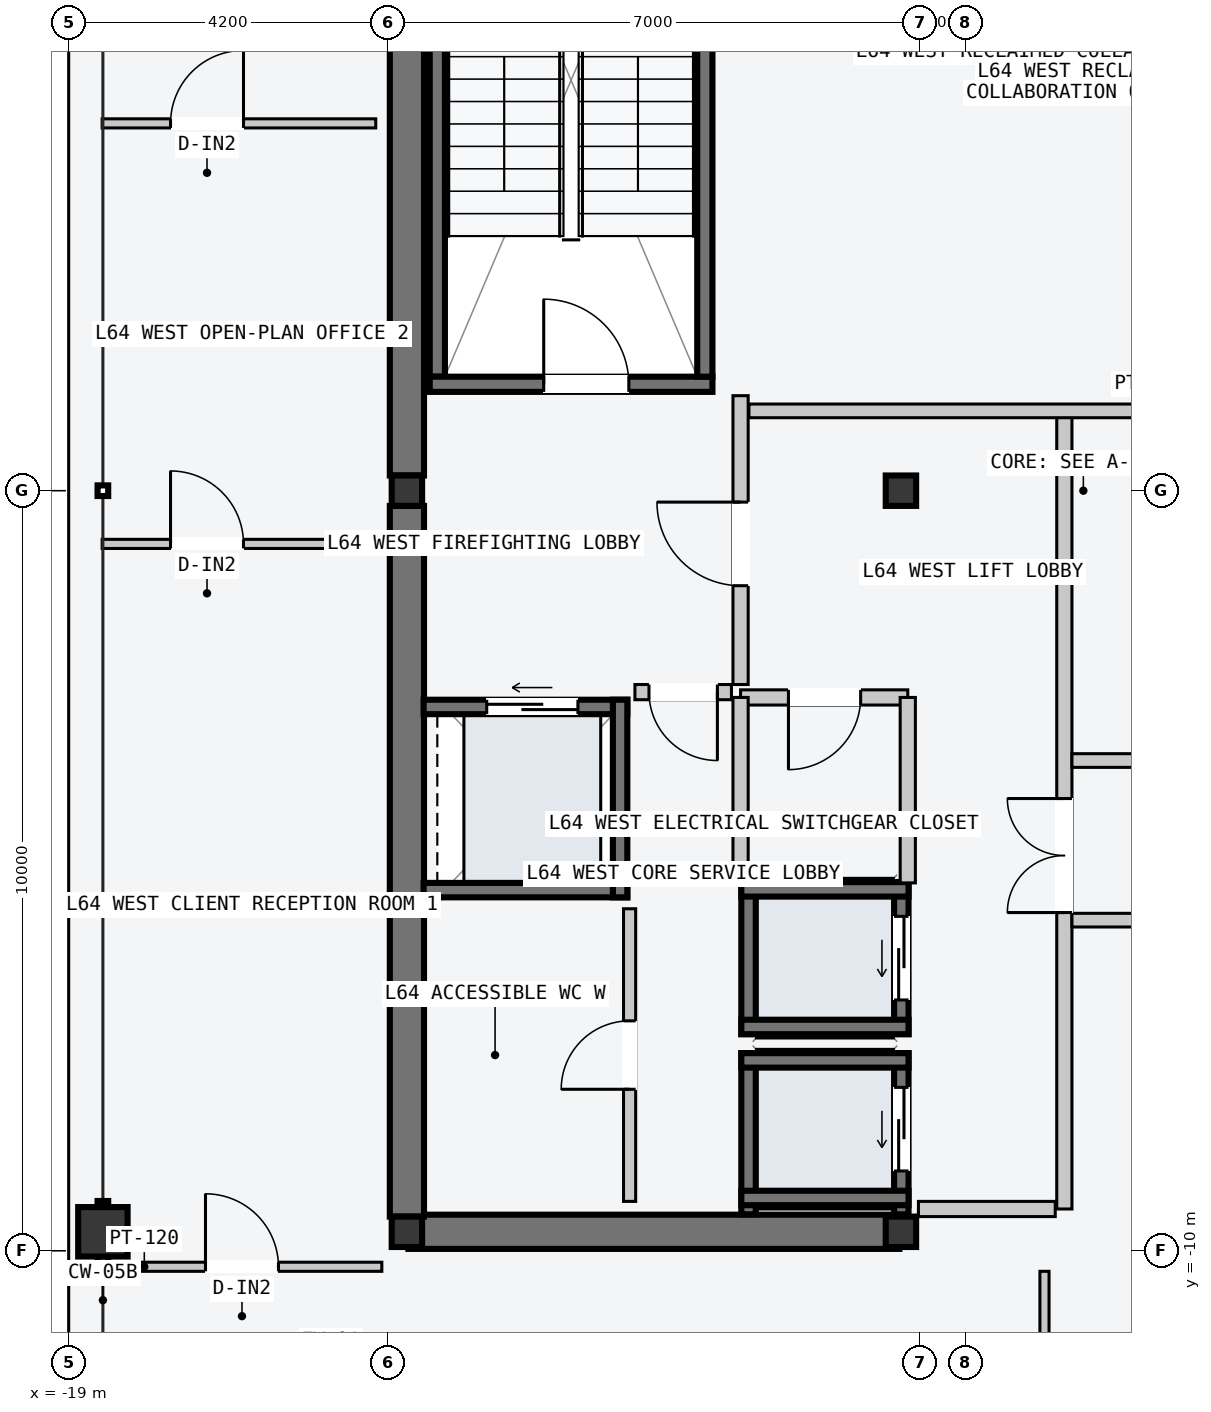
"""IFC4 building model, lengths in metres.
Left out: names, types, materials, properties, quantities, classifications, styles, units other than length and angle.
Written with IfcOpenShell. Run it as: python <this file> out.ifc"""

import sys

from ifc_helpers import new_model, si_unit, direction, frame, frame_2d, origin, origin_2d, place, context, subcontext, project, spatial, rectangle, hollow_rectangle, i_section, extrude, element, fill, save


model = new_model("IFC4")
c1 = context("Model", 3, precision=1e-05, world=origin(), true_north=direction((0.0, 1.0)))
c2 = subcontext(c1, "Body", "Model", "MODEL_VIEW")
j1 = project(units=[si_unit("LENGTHUNIT", "METRE"), si_unit("PLANEANGLEUNIT", "RADIAN")], contexts=[c1])
p1 = place(None, origin())
s1 = spatial("IfcSite", under=j1, at=p1, CompositionType="ELEMENT")
p2 = place(p1, origin())
s2 = spatial("IfcBuilding", under=s1, at=p2, CompositionType="ELEMENT")
p3 = place(p2, frame((0.0, 0.0, 243.6)))
s3 = spatial("IfcBuildingStorey", under=s2, at=p3, CompositionType="ELEMENT", Elevation=243.6)
p4 = place(p3, frame((-14.53, -9.75, -0.2), z_axis=(0.0, 0.0, 1.0), x_axis=(1.0, 0.0, 0.0)))
e1 = element("IfcWall", 1, at=p4, inside=s3, PredefinedType="SHEAR", context=c2, shape_type="SweptSolid", body=[
    extrude(rectangle(XDim=6.46, YDim=0.45, at=frame_2d((3.23, 0.0))), origin(), (0.0, 0.0, 1.0), 3.6),
])
for number, where, z_axis, x_axis in (
    (2, (-14.55, -9.55, -0.2), (0.0, 0.0, 1.0), (0.0, 1.0, 0.0)),
    (3, (-14.55, 0.2, -0.2), (0.0, 0.0, 1.0), (0.0, 1.0, 0.0)),
):
    element("IfcWall", number, at=place(p3, frame(where, z_axis=z_axis, x_axis=x_axis)), inside=s3, PredefinedType="SHEAR", context=c2, shape_type="SweptSolid", body=[
        extrude(rectangle(XDim=9.35, YDim=0.45, at=frame_2d((4.675, 0.0))), origin(), (0.0, 0.0, 1.0), 3.6),
    ])
p5 = place(p3, frame((-14.15, 1.5, -0.2), z_axis=(0.0, 0.0, 1.0), x_axis=(0.0, 1.0, 0.0)))
e4 = element("IfcWall", 4, at=p5, inside=s3, PredefinedType="SOLIDWALL", context=c2, shape_type="SweptSolid", body=[
    extrude(rectangle(XDim=7.8, YDim=0.2, at=frame_2d((3.9, 0.0))), origin(), (0.0, 0.0, 1.0), 3.6),
])
p6 = place(p3, frame((-14.25, 1.4, -0.2), z_axis=(0.0, 0.0, 1.0), x_axis=(1.0, 0.0, 0.0)))
e5 = element("IfcWall", 5, at=p6, inside=s3, PredefinedType="SOLIDWALL", context=c2, shape_type="SweptSolid", body=[
    extrude(rectangle(XDim=3.72, YDim=0.2, at=frame_2d((1.86, 0.0))), origin(), (0.0, 0.0, 1.0), 3.6),
])
p7 = place(p6, frame((1.5, 0.0, 0.2)))
e6 = element("IfcOpeningElement", 6, at=p7, cuts=e5, PredefinedType="OPENING", context=c2, shape_type="SweptSolid", body=[
    extrude(rectangle(XDim=1.12, YDim=2.18, at=frame_2d((0.56, 1.09))), frame((0.0, 0.11, 0.0), z_axis=(0.0, -1.0, 0.0), x_axis=(1.0, 0.0, 0.0)), (0.0, 0.0, 1.0), 0.22),
])
p8 = place(p3, frame((-10.63, 1.5, -0.2), z_axis=(0.0, 0.0, 1.0), x_axis=(0.0, 1.0, 0.0)))
e7 = element("IfcWall", 7, at=p8, inside=s3, PredefinedType="SOLIDWALL", context=c2, shape_type="SweptSolid", body=[
    extrude(rectangle(XDim=7.8, YDim=0.2, at=frame_2d((3.9, 0.0))), origin(), (0.0, 0.0, 1.0), 3.6),
])
for number, where, z_axis, x_axis in (
    (8, (-14.55, -9.75, 0.0), (0.0, 0.0, 1.0), (1.0, 0.0, 0.0)),
    (9, (-14.55, 0.0, 0.0), (0.0, 0.0, 1.0), (1.0, 0.0, 0.0)),
    (10, (-8.05, -9.75, 0.0), (0.0, 0.0, 1.0), (1.0, 0.0, 0.0)),
    (11, (-8.05, 0.0, 0.0), (0.0, 0.0, 1.0), (1.0, 0.0, 0.0)),
):
    element("IfcColumn", number, at=place(p3, frame(where, z_axis=z_axis, x_axis=x_axis)), inside=s3, PredefinedType="COLUMN", context=c2, shape_type="SweptSolid", body=[
        extrude(i_section(OverallWidth=0.4, OverallDepth=0.4, WebThickness=0.013, FlangeThickness=0.021, at=origin_2d()), origin(), (0.0, 0.0, 1.0), 3.6),
    ])
p9 = place(p3, frame((-18.55, -9.75, 0.0), z_axis=(0.0, 0.0, 1.0), x_axis=(0.0, 1.0, 0.0)))
e12 = element("IfcColumn", 12, at=p9, inside=s3, PredefinedType="COLUMN", context=c2, shape_type="SweptSolid", body=[
    extrude(hollow_rectangle(XDim=0.65, YDim=0.65, WallThickness=0.028, at=origin_2d()), origin(), (0.0, 0.0, 1.0), 3.6),
])
p10 = place(p3, frame((-8.045, -9.52, -0.2), z_axis=(0.0, 0.0, 1.0), x_axis=(0.0, 1.0, 0.0)))
e13 = element("IfcWall", 13, at=p10, inside=s3, PredefinedType="SOLIDWALL", context=c2, shape_type="SweptSolid", body=[
    extrude(rectangle(XDim=2.12, YDim=0.19, at=frame_2d((1.06, 0.0))), origin(), (0.0, 0.0, 1.0), 3.6),
])
p11 = place(p10, frame((0.57, 0.0, 0.2)))
e14 = element("IfcOpeningElement", 14, at=p11, cuts=e13, PredefinedType="OPENING", context=c2, shape_type="SweptSolid", body=[
    extrude(rectangle(XDim=1.1, YDim=2.2, at=frame_2d((0.55, 1.1))), frame((0.0, 0.105, 0.0), z_axis=(0.0, -1.0, 0.0), x_axis=(1.0, 0.0, 0.0)), (0.0, 0.0, 1.0), 0.21),
])
p12 = place(p3, frame((-10.055, -9.52, -0.2), z_axis=(0.0, 0.0, 1.0), x_axis=(0.0, 1.0, 0.0)))
e15 = element("IfcWall", 15, at=p12, inside=s3, PredefinedType="SOLIDWALL", context=c2, shape_type="SweptSolid", body=[
    extrude(rectangle(XDim=2.12, YDim=0.19, at=frame_2d((1.06, 0.0))), origin(), (0.0, 0.0, 1.0), 3.6),
])
for number, where, z_axis, x_axis in (
    (16, (-10.15, -7.495, -0.2), (0.0, 0.0, 1.0), (1.0, 0.0, 0.0)),
    (17, (-10.15, -9.305, -0.2), (0.0, 0.0, 1.0), (1.0, 0.0, 0.0)),
):
    element("IfcWall", number, at=place(p3, frame(where, z_axis=z_axis, x_axis=x_axis)), inside=s3, PredefinedType="SOLIDWALL", context=c2, shape_type="SweptSolid", body=[
        extrude(rectangle(XDim=2.2, YDim=0.19, at=frame_2d((1.1, 0.0))), origin(), (0.0, 0.0, 1.0), 3.6),
    ])
p13 = place(p3, frame((-8.045, -7.15, -0.2), z_axis=(0.0, 0.0, 1.0), x_axis=(0.0, 1.0, 0.0)))
e18 = element("IfcWall", 18, at=p13, inside=s3, PredefinedType="SOLIDWALL", context=c2, shape_type="SweptSolid", body=[
    extrude(rectangle(XDim=2.0, YDim=0.19, at=frame_2d((1.0, 0.0))), origin(), (0.0, 0.0, 1.0), 3.6),
])
p14 = place(p13, frame((0.45, 0.0, 0.2)))
e19 = element("IfcOpeningElement", 19, at=p14, cuts=e18, PredefinedType="OPENING", context=c2, shape_type="SweptSolid", body=[
    extrude(rectangle(XDim=1.1, YDim=2.2, at=frame_2d((0.55, 1.1))), frame((0.0, 0.105, 0.0), z_axis=(0.0, -1.0, 0.0), x_axis=(1.0, 0.0, 0.0)), (0.0, 0.0, 1.0), 0.21),
])
p15 = place(p3, frame((-10.055, -7.15, -0.2), z_axis=(0.0, 0.0, 1.0), x_axis=(0.0, 1.0, 0.0)))
e20 = element("IfcWall", 20, at=p15, inside=s3, PredefinedType="SOLIDWALL", context=c2, shape_type="SweptSolid", body=[
    extrude(rectangle(XDim=2.0, YDim=0.19, at=frame_2d((1.0, 0.0))), origin(), (0.0, 0.0, 1.0), 3.6),
])
for number, where, z_axis, x_axis in (
    (21, (-10.15, -5.245, -0.2), (0.0, 0.0, 1.0), (1.0, 0.0, 0.0)),
    (22, (-10.15, -7.055, -0.2), (0.0, 0.0, 1.0), (1.0, 0.0, 0.0)),
):
    element("IfcWall", number, at=place(p3, frame(where, z_axis=z_axis, x_axis=x_axis)), inside=s3, PredefinedType="SOLIDWALL", context=c2, shape_type="SweptSolid", body=[
        extrude(rectangle(XDim=2.2, YDim=0.19, at=frame_2d((1.1, 0.0))), origin(), (0.0, 0.0, 1.0), 3.6),
    ])
p16 = place(p3, frame((-14.33, -2.845, -0.2), z_axis=(0.0, 0.0, 1.0), x_axis=(1.0, 0.0, 0.0)))
e23 = element("IfcWall", 23, at=p16, inside=s3, PredefinedType="SOLIDWALL", context=c2, shape_type="SweptSolid", body=[
    extrude(rectangle(XDim=2.68, YDim=0.19, at=frame_2d((1.34, 0.0))), origin(), (0.0, 0.0, 1.0), 3.6),
])
p17 = place(p16, frame((0.83, 0.0, 0.2)))
e24 = element("IfcOpeningElement", 24, at=p17, cuts=e23, PredefinedType="OPENING", context=c2, shape_type="SweptSolid", body=[
    extrude(rectangle(XDim=1.2, YDim=2.2, at=frame_2d((0.6, 1.1))), frame((0.0, 0.105, 0.0), z_axis=(0.0, -1.0, 0.0), x_axis=(1.0, 0.0, 0.0)), (0.0, 0.0, 1.0), 0.21),
])
p18 = place(p3, frame((-14.33, -5.255, -0.2), z_axis=(0.0, 0.0, 1.0), x_axis=(1.0, 0.0, 0.0)))
e25 = element("IfcWall", 25, at=p18, inside=s3, PredefinedType="SOLIDWALL", context=c2, shape_type="SweptSolid", body=[
    extrude(rectangle(XDim=2.68, YDim=0.19, at=frame_2d((1.34, 0.0))), origin(), (0.0, 0.0, 1.0), 3.6),
])
p19 = place(p3, frame((-11.745, -5.35, -0.2), z_axis=(0.0, 0.0, 1.0), x_axis=(0.0, 1.0, 0.0)))
e26 = element("IfcWall", 26, at=p19, inside=s3, PredefinedType="SOLIDWALL", context=c2, shape_type="SweptSolid", body=[
    extrude(rectangle(XDim=2.6, YDim=0.19, at=frame_2d((1.3, 0.0))), origin(), (0.0, 0.0, 1.0), 3.6),
])
p20 = place(p3, frame((-5.9, -9.45, 0.0), z_axis=(0.0, 0.0, 1.0), x_axis=(0.0, 1.0, 0.0)))
e27 = element("IfcWall", 27, at=p20, inside=s3, PredefinedType="PARTITIONING", context=c2, shape_type="SweptSolid", body=[
    extrude(rectangle(XDim=10.5, YDim=0.2, at=frame_2d((5.25, 0.0))), origin(), (0.0, 0.0, 1.0), 3.4),
])
p21 = place(p20, frame((3.9, 0.0, 0.0)))
e28 = element("IfcOpeningElement", 28, at=p21, cuts=e27, PredefinedType="OPENING", context=c2, shape_type="SweptSolid", body=[
    extrude(rectangle(XDim=1.5, YDim=2.2, at=frame_2d((0.75, 1.1))), frame((0.0, 0.11, 0.0), z_axis=(0.0, -1.0, 0.0), x_axis=(1.0, 0.0, 0.0)), (0.0, 0.0, 1.0), 0.22),
])
p22 = place(p3, frame((-6.02, -9.45, 0.0), z_axis=(0.0, 0.0, 1.0), x_axis=(-1.0, 0.0, 0.0)))
e29 = element("IfcWall", 29, at=p22, inside=s3, PredefinedType="PARTITIONING", context=c2, shape_type="SweptSolid", body=[
    extrude(rectangle(XDim=1.8, YDim=0.2, at=frame_2d((0.9, 0.0))), origin(), (0.0, 0.0, 1.0), 3.4),
])
p23 = place(p3, frame((-10.16, -2.55, 0.0), z_axis=(0.0, 0.0, 1.0), x_axis=(0.0, 1.0, 0.0)))
e30 = element("IfcWall", 30, at=p23, inside=s3, PredefinedType="PARTITIONING", context=c2, shape_type="SweptSolid", body=[
    extrude(rectangle(XDim=3.8, YDim=0.2, at=frame_2d((1.9, 0.0))), origin(), (0.0, 0.0, 1.0), 3.4),
])
p24 = place(p23, frame((1.3, 0.0, 0.0)))
e31 = element("IfcOpeningElement", 31, at=p24, cuts=e30, PredefinedType="OPENING", context=c2, shape_type="SweptSolid", body=[
    extrude(rectangle(XDim=1.1, YDim=2.15, at=frame_2d((0.55, 1.075))), frame((0.0, 0.11, 0.0), z_axis=(0.0, -1.0, 0.0), x_axis=(1.0, 0.0, 0.0)), (0.0, 0.0, 1.0), 0.22),
])
p25 = place(p3, frame((-10.28, -2.65, 0.0), z_axis=(0.0, 0.0, 1.0), x_axis=(-1.0, 0.0, 0.0)))
e32 = element("IfcWall", 32, at=p25, inside=s3, PredefinedType="PARTITIONING", context=c2, shape_type="SweptSolid", body=[
    extrude(rectangle(XDim=1.27, YDim=0.2, at=frame_2d((0.635, 0.0))), origin(), (0.0, 0.0, 1.0), 3.4),
])
p26 = place(p25, frame((0.185, 0.0, 0.0)))
e33 = element("IfcOpeningElement", 33, at=p26, cuts=e32, PredefinedType="OPENING", context=c2, shape_type="SweptSolid", body=[
    extrude(rectangle(XDim=0.9, YDim=2.15, at=frame_2d((0.45, 1.075))), frame((0.0, 0.11, 0.0), z_axis=(0.0, -1.0, 0.0), x_axis=(1.0, 0.0, 0.0)), (0.0, 0.0, 1.0), 0.22),
])
p27 = place(p3, frame((-7.96, -2.72, 0.0), z_axis=(0.0, 0.0, 1.0), x_axis=(-1.0, 0.0, 0.0)))
e34 = element("IfcWall", 34, at=p27, inside=s3, PredefinedType="PARTITIONING", context=c2, shape_type="SweptSolid", body=[
    extrude(rectangle(XDim=2.2, YDim=0.2, at=frame_2d((1.1, 0.0))), origin(), (0.0, 0.0, 1.0), 3.4),
])
p28 = place(p27, frame((0.62, 0.0, 0.0)))
e35 = element("IfcOpeningElement", 35, at=p28, cuts=e34, PredefinedType="OPENING", context=c2, shape_type="SweptSolid", body=[
    extrude(rectangle(XDim=0.95, YDim=2.1, at=frame_2d((0.475, 1.05))), frame((0.0, 0.11, 0.0), z_axis=(0.0, -1.0, 0.0), x_axis=(1.0, 0.0, 0.0)), (0.0, 0.0, 1.0), 0.22),
])
for number, where, z_axis, x_axis in (
    (36, (-7.96, -5.16, 0.0), (0.0, 0.0, 1.0), (0.0, 1.0, 0.0)),
    (37, (-10.16, -5.16, 0.0), (0.0, 0.0, 1.0), (0.0, 1.0, 0.0)),
):
    element("IfcWall", number, at=place(p3, frame(where, z_axis=z_axis, x_axis=x_axis)), inside=s3, PredefinedType="PARTITIONING", context=c2, shape_type="SweptSolid", body=[
        extrude(rectangle(XDim=2.44, YDim=0.2, at=frame_2d((1.22, 0.0))), origin(), (0.0, 0.0, 1.0), 3.4),
    ])
p29 = place(p3, frame((-11.62, -9.35, 0.0), z_axis=(0.0, 0.0, 1.0), x_axis=(0.0, 1.0, 0.0)))
e38 = element("IfcWall", 38, at=p29, inside=s3, PredefinedType="PARTITIONING", context=c2, shape_type="SweptSolid", body=[
    extrude(rectangle(XDim=3.85, YDim=0.16, at=frame_2d((1.925, 0.0))), origin(), (0.0, 0.0, 1.0), 3.4),
])
p30 = place(p29, frame((1.475, 0.0, 0.0)))
e39 = element("IfcOpeningElement", 39, at=p30, cuts=e38, PredefinedType="OPENING", context=c2, shape_type="SweptSolid", body=[
    extrude(rectangle(XDim=0.9, YDim=2.15, at=frame_2d((0.45, 1.075))), frame((0.0, 0.09, 0.0), z_axis=(0.0, -1.0, 0.0), x_axis=(1.0, 0.0, 0.0)), (0.0, 0.0, 1.0), 0.18),
])
p31 = place(p3, frame((-10.05, 1.05, 0.0), z_axis=(0.0, 0.0, 1.0), x_axis=(1.0, 0.0, 0.0)))
e40 = element("IfcWall", 40, at=p31, inside=s3, PredefinedType="PARTITIONING", context=c2, shape_type="SweptSolid", body=[
    extrude(rectangle(XDim=10.54, YDim=0.18, at=frame_2d((5.27, 0.0))), origin(), (0.0, 0.0, 1.0), 3.4),
])
for number, where, z_axis, x_axis in (
    (41, (-5.8, -3.55, 0.0), (0.0, 0.0, 1.0), (1.0, 0.0, 0.0)),
    (42, (-5.8, -5.65, 0.0), (0.0, 0.0, 1.0), (1.0, 0.0, 0.0)),
):
    element("IfcWall", number, at=place(p3, frame(where, z_axis=z_axis, x_axis=x_axis)), inside=s3, PredefinedType="PARTITIONING", context=c2, shape_type="SweptSolid", body=[
        extrude(rectangle(XDim=6.29, YDim=0.18, at=frame_2d((3.145, 0.0))), origin(), (0.0, 0.0, 1.0), 3.4),
    ])
p32 = place(p3, frame((-6.161, -17.56, 0.0), z_axis=(0.0, 0.0, 1.0), x_axis=(0.0, 1.0, 0.0)))
e43 = element("IfcWall", 43, at=p32, inside=s3, PredefinedType="PARTITIONING", context=c2, shape_type="SweptSolid", body=[
    extrude(rectangle(XDim=7.29, YDim=0.12, at=frame_2d((3.645, 0.0))), origin(), (0.0, 0.0, 1.0), 3.4),
])
p33 = place(p32, frame((1.05, 0.0, 0.0)))
e44 = element("IfcOpeningElement", 44, at=p33, cuts=e43, PredefinedType="OPENING", context=c2, shape_type="SweptSolid", body=[
    extrude(rectangle(XDim=0.96, YDim=2.18, at=frame_2d((0.48, 1.09))), frame((0.0, 0.07, 0.0), z_axis=(0.0, -1.0, 0.0), x_axis=(1.0, 0.0, 0.0)), (0.0, 0.0, 1.0), 0.14),
])
p34 = place(p3, frame((-18.56, -10.21, 0.0), z_axis=(0.0, 0.0, 1.0), x_axis=(1.0, 0.0, 0.0)))
e45 = element("IfcWall", 45, at=p34, inside=s3, PredefinedType="PARTITIONING", context=c2, shape_type="SweptSolid", body=[
    extrude(rectangle(XDim=3.68, YDim=0.12, at=frame_2d((1.84, 0.0))), origin(), (0.0, 0.0, 1.0), 3.4),
])
p35 = place(p34, frame((1.36, 0.0, 0.0)))
e46 = element("IfcOpeningElement", 46, at=p35, cuts=e45, PredefinedType="OPENING", context=c2, shape_type="SweptSolid", body=[
    extrude(rectangle(XDim=0.96, YDim=2.18, at=frame_2d((0.48, 1.09))), frame((0.0, 0.07, 0.0), z_axis=(0.0, -1.0, 0.0), x_axis=(1.0, 0.0, 0.0)), (0.0, 0.0, 1.0), 0.14),
])
p36 = place(p3, frame((-18.56, -0.7, 0.0), z_axis=(0.0, 0.0, 1.0), x_axis=(1.0, 0.0, 0.0)))
e47 = element("IfcWall", 47, at=p36, inside=s3, PredefinedType="PARTITIONING", context=c2, shape_type="SweptSolid", body=[
    extrude(rectangle(XDim=3.6, YDim=0.12, at=frame_2d((1.8, 0.0))), origin(), (0.0, 0.0, 1.0), 3.4),
])
p37 = place(p36, frame((0.9, 0.0, 0.0)))
e48 = element("IfcOpeningElement", 48, at=p37, cuts=e47, PredefinedType="OPENING", context=c2, shape_type="SweptSolid", body=[
    extrude(rectangle(XDim=0.96, YDim=2.18, at=frame_2d((0.48, 1.09))), frame((0.0, 0.07, 0.0), z_axis=(0.0, -1.0, 0.0), x_axis=(1.0, 0.0, 0.0)), (0.0, 0.0, 1.0), 0.14),
])
p38 = place(p3, frame((-18.56, 4.833, 0.0), z_axis=(0.0, 0.0, 1.0), x_axis=(1.0, 0.0, 0.0)))
e49 = element("IfcWall", 49, at=p38, inside=s3, PredefinedType="PARTITIONING", context=c2, shape_type="SweptSolid", body=[
    extrude(rectangle(XDim=3.6, YDim=0.12, at=frame_2d((1.8, 0.0))), origin(), (0.0, 0.0, 1.0), 3.4),
])
p39 = place(p38, frame((0.9, 0.0, 0.0)))
e50 = element("IfcOpeningElement", 50, at=p39, cuts=e49, PredefinedType="OPENING", context=c2, shape_type="SweptSolid", body=[
    extrude(rectangle(XDim=0.96, YDim=2.18, at=frame_2d((0.48, 1.09))), frame((0.0, 0.07, 0.0), z_axis=(0.0, -1.0, 0.0), x_axis=(1.0, 0.0, 0.0)), (0.0, 0.0, 1.0), 0.14),
])
p40 = place(p7, origin())
e51 = element("IfcDoor", 51, at=p40, inside=s3, OperationType="SINGLE_SWING_LEFT", PredefinedType="DOOR", context=c2, shape_type="SweptSolid", body=[
    extrude(rectangle(XDim=1.12, YDim=2.18, at=frame_2d((0.56, 1.09))), frame((0.0, 0.025, 0.0), z_axis=(0.0, -1.0, 0.0), x_axis=(1.0, 0.0, 0.0)), (0.0, 0.0, 1.0), 0.05),
])
fill(e6, e51)
p41 = place(p11, origin())
e52 = element("IfcDoor", 52, at=p41, inside=s3, OperationType="SLIDING_TO_LEFT", PredefinedType="DOOR", context=c2, shape_type="SweptSolid", body=[
    extrude(rectangle(XDim=1.1, YDim=2.2, at=frame_2d((0.55, 1.1))), frame((0.0, 0.025, 0.0), z_axis=(0.0, -1.0, 0.0), x_axis=(1.0, 0.0, 0.0)), (0.0, 0.0, 1.0), 0.05),
])
fill(e14, e52)
p42 = place(p14, origin())
e53 = element("IfcDoor", 53, at=p42, inside=s3, OperationType="SLIDING_TO_LEFT", PredefinedType="DOOR", context=c2, shape_type="SweptSolid", body=[
    extrude(rectangle(XDim=1.1, YDim=2.2, at=frame_2d((0.55, 1.1))), frame((0.0, 0.025, 0.0), z_axis=(0.0, -1.0, 0.0), x_axis=(1.0, 0.0, 0.0)), (0.0, 0.0, 1.0), 0.05),
])
fill(e19, e53)
p43 = place(p17, origin())
e54 = element("IfcDoor", 54, at=p43, inside=s3, OperationType="SLIDING_TO_LEFT", PredefinedType="DOOR", context=c2, shape_type="SweptSolid", body=[
    extrude(rectangle(XDim=1.2, YDim=2.2, at=frame_2d((0.6, 1.1))), frame((0.0, 0.025, 0.0), z_axis=(0.0, -1.0, 0.0), x_axis=(1.0, 0.0, 0.0)), (0.0, 0.0, 1.0), 0.05),
])
fill(e24, e54)
p44 = place(p21, origin())
e55 = element("IfcDoor", 55, at=p44, inside=s3, OperationType="DOUBLE_DOOR_SINGLE_SWING", PredefinedType="DOOR", context=c2, shape_type="SweptSolid", body=[
    extrude(rectangle(XDim=1.5, YDim=2.2, at=frame_2d((0.75, 1.1))), frame((0.0, 0.025, 0.0), z_axis=(0.0, -1.0, 0.0), x_axis=(1.0, 0.0, 0.0)), (0.0, 0.0, 1.0), 0.05),
])
fill(e28, e55)
p45 = place(p24, origin())
e56 = element("IfcDoor", 56, at=p45, inside=s3, OperationType="SINGLE_SWING_RIGHT", PredefinedType="DOOR", context=c2, shape_type="SweptSolid", body=[
    extrude(rectangle(XDim=1.1, YDim=2.15, at=frame_2d((0.55, 1.075))), frame((0.0, 0.025, 0.0), z_axis=(0.0, -1.0, 0.0), x_axis=(1.0, 0.0, 0.0)), (0.0, 0.0, 1.0), 0.05),
])
fill(e31, e56)
p46 = place(p26, origin())
e57 = element("IfcDoor", 57, at=p46, inside=s3, OperationType="SINGLE_SWING_LEFT", PredefinedType="DOOR", context=c2, shape_type="SweptSolid", body=[
    extrude(rectangle(XDim=0.9, YDim=2.15, at=frame_2d((0.45, 1.075))), frame((0.0, 0.025, 0.0), z_axis=(0.0, -1.0, 0.0), x_axis=(1.0, 0.0, 0.0)), (0.0, 0.0, 1.0), 0.05),
])
fill(e33, e57)
p47 = place(p28, origin())
e58 = element("IfcDoor", 58, at=p47, inside=s3, OperationType="SINGLE_SWING_RIGHT", PredefinedType="DOOR", context=c2, shape_type="SweptSolid", body=[
    extrude(rectangle(XDim=0.95, YDim=2.1, at=frame_2d((0.475, 1.05))), frame((0.0, 0.025, 0.0), z_axis=(0.0, -1.0, 0.0), x_axis=(1.0, 0.0, 0.0)), (0.0, 0.0, 1.0), 0.05),
])
fill(e35, e58)
p48 = place(p30, origin())
e59 = element("IfcDoor", 59, at=p48, inside=s3, OperationType="SINGLE_SWING_LEFT", PredefinedType="DOOR", context=c2, shape_type="SweptSolid", body=[
    extrude(rectangle(XDim=0.9, YDim=2.15, at=frame_2d((0.45, 1.075))), frame((0.0, 0.025, 0.0), z_axis=(0.0, -1.0, 0.0), x_axis=(1.0, 0.0, 0.0)), (0.0, 0.0, 1.0), 0.05),
])
fill(e39, e59)
p49 = place(p35, origin())
e60 = element("IfcDoor", 60, at=p49, inside=s3, OperationType="SINGLE_SWING_LEFT", PredefinedType="DOOR", context=c2, shape_type="SweptSolid", body=[
    extrude(rectangle(XDim=0.96, YDim=2.18, at=frame_2d((0.48, 1.09))), frame((0.0, 0.025, 0.0), z_axis=(0.0, -1.0, 0.0), x_axis=(1.0, 0.0, 0.0)), (0.0, 0.0, 1.0), 0.05),
])
fill(e46, e60)
p50 = place(p37, origin())
e61 = element("IfcDoor", 61, at=p50, inside=s3, OperationType="SINGLE_SWING_LEFT", PredefinedType="DOOR", context=c2, shape_type="SweptSolid", body=[
    extrude(rectangle(XDim=0.96, YDim=2.18, at=frame_2d((0.48, 1.09))), frame((0.0, 0.025, 0.0), z_axis=(0.0, -1.0, 0.0), x_axis=(1.0, 0.0, 0.0)), (0.0, 0.0, 1.0), 0.05),
])
fill(e48, e61)
p51 = place(p39, origin())
e62 = element("IfcDoor", 62, at=p51, inside=s3, OperationType="SINGLE_SWING_RIGHT", PredefinedType="DOOR", context=c2, shape_type="SweptSolid", body=[
    extrude(rectangle(XDim=0.96, YDim=2.18, at=frame_2d((0.48, 1.09))), frame((0.0, 0.025, 0.0), z_axis=(0.0, -1.0, 0.0), x_axis=(1.0, 0.0, 0.0)), (0.0, 0.0, 1.0), 0.05),
])
fill(e50, e62)
save(model, sys.argv[1])
